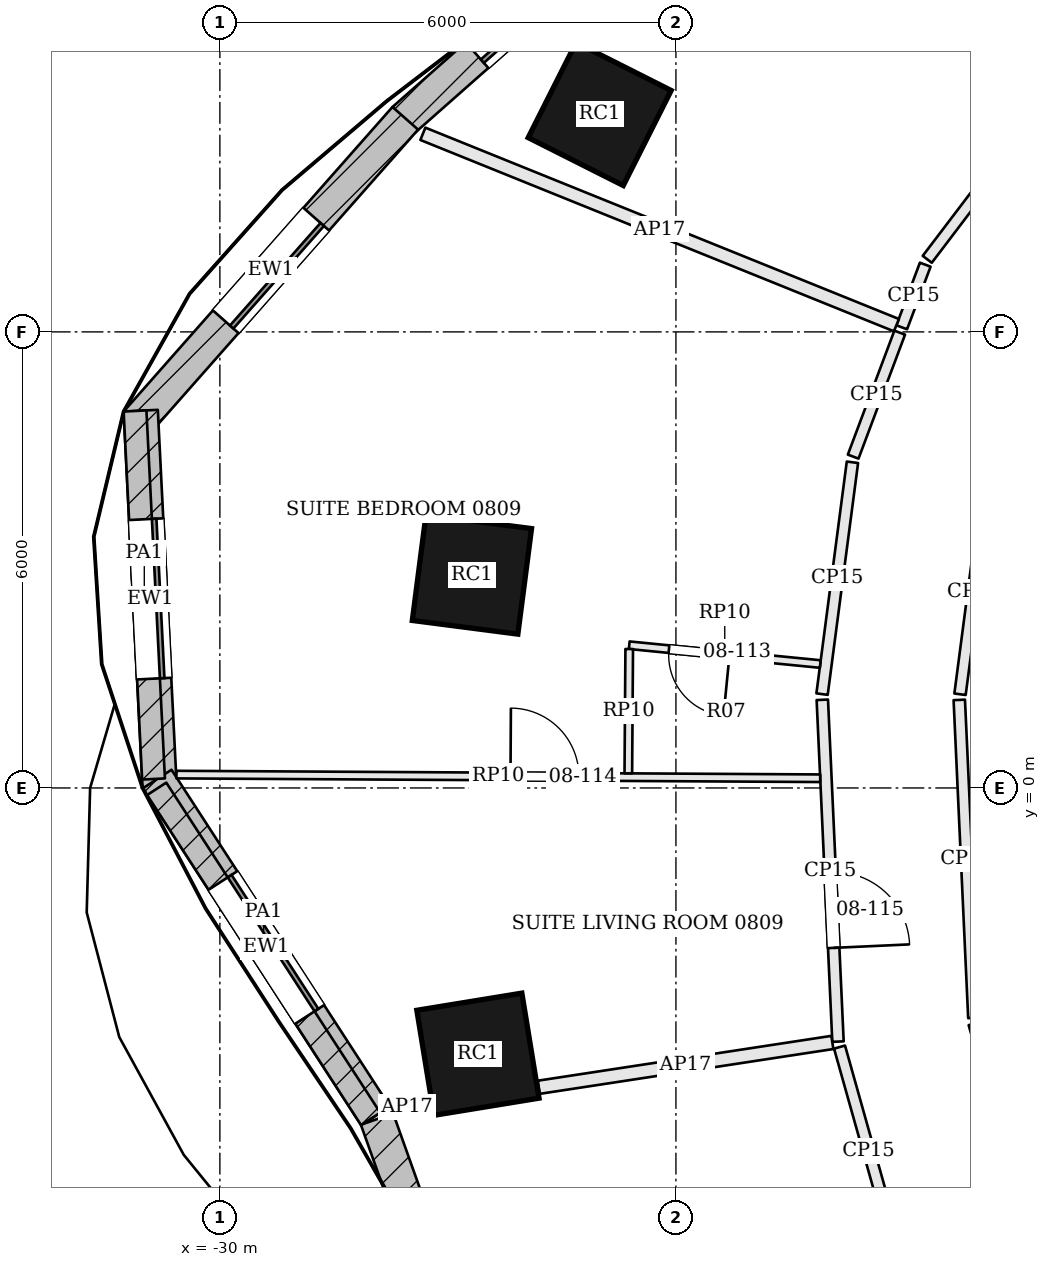
"""IFC4 building model, lengths in metres.
Left out: names, types, materials, properties, quantities, classifications, styles, units other than length and angle.
Written with IfcOpenShell. Run it as: python <this file> out.ifc"""

import sys

from ifc_helpers import new_model, si_unit, direction, frame, frame_2d, origin, origin_2d, place, context, subcontext, project, spatial, rectangle, extrude, element, fill, save


model = new_model("IFC4")
c1 = context("Model", 3, precision=1e-05, world=origin(), true_north=direction((0.0, 1.0)))
c2 = subcontext(c1, "Body", "Model", "MODEL_VIEW")
j1 = project(units=[si_unit("LENGTHUNIT", "METRE"), si_unit("PLANEANGLEUNIT", "RADIAN")], contexts=[c1])
p1 = place(None, origin())
s1 = spatial("IfcSite", under=j1, at=p1, CompositionType="ELEMENT")
p2 = place(p1, origin())
s2 = spatial("IfcBuilding", under=s1, at=p2, CompositionType="ELEMENT")
p3 = place(p2, frame((0.0, 0.0, 44.7)))
s3 = spatial("IfcBuildingStorey", under=s2, at=p3, CompositionType="ELEMENT", Elevation=44.7)
for number, where, z_axis, x_axis in (
    (1, (-25.003, 8.866, 0.0), (0.0, 0.0, 1.0), (-0.45, -0.893, 0.0)),
    (2, (-26.684, 2.808, 0.0), (0.0, 0.0, 1.0), (-0.128, -0.992, 0.0)),
    (3, (-26.605, -3.503, 0.0), (0.0, 0.0, 1.0), (0.161, -0.987, 0.0)),
):
    element("IfcColumn", number, at=place(p3, frame(where, z_axis=z_axis, x_axis=x_axis)), inside=s3, PredefinedType="COLUMN", context=c2, shape_type="SweptSolid", body=[
        extrude(rectangle(XDim=1.4, YDim=1.4, at=origin_2d()), origin(), (0.0, 0.0, 1.0), 3.6),
    ])
p4 = place(p3, frame((-24.078, 11.88, 0.0), z_axis=(0.0, 0.0, 1.0), x_axis=(-0.749778352475, -0.661689067583, 0.0)))
e4 = element("IfcWall", 4, at=p4, inside=s3, PredefinedType="SOLIDWALL", context=c2, shape_type="SweptSolid", body=[
    extrude(rectangle(XDim=4.67, YDim=0.45, at=frame_2d((2.335, 0.0))), origin(), (0.0, 0.0, 1.0), 3.4),
])
p5 = place(p4, frame((1.285, 0.0, 0.9)))
e5 = element("IfcOpeningElement", 5, at=p5, cuts=e4, PredefinedType="OPENING", context=c2, shape_type="SweptSolid", body=[
    extrude(rectangle(XDim=2.1, YDim=2.0, at=frame_2d((1.05, 1.0))), frame((0.0, 0.235, 0.0), z_axis=(0.0, -1.0, 0.0), x_axis=(1.0, 0.0, 0.0)), (0.0, 0.0, 1.0), 0.47),
])
p6 = place(p3, frame((-27.561, 8.81, 0.0), z_axis=(0.0, 0.0, 1.0), x_axis=(-0.661706312809, -0.749763132989, 0.0)))
e6 = element("IfcWall", 6, at=p6, inside=s3, PredefinedType="SOLIDWALL", context=c2, shape_type="SweptSolid", body=[
    extrude(rectangle(XDim=5.34, YDim=0.45, at=frame_2d((2.67, 0.0))), origin(), (0.0, 0.0, 1.0), 3.4),
])
p7 = place(p6, frame((1.77, 0.0, 0.9)))
e7 = element("IfcOpeningElement", 7, at=p7, cuts=e6, PredefinedType="OPENING", context=c2, shape_type="SweptSolid", body=[
    extrude(rectangle(XDim=1.8, YDim=2.0, at=frame_2d((0.9, 1.0))), frame((0.0, 0.235, 0.0), z_axis=(0.0, -1.0, 0.0), x_axis=(1.0, 0.0, 0.0)), (0.0, 0.0, 1.0), 0.47),
])
p8 = place(p3, frame((-31.041, 4.963, 0.0), z_axis=(0.0, 0.0, 1.0), x_axis=(0.050222481563, -0.99873805492, 0.0)))
e8 = element("IfcWall", 8, at=p8, inside=s3, PredefinedType="SOLIDWALL", context=c2, shape_type="SweptSolid", body=[
    extrude(rectangle(XDim=4.958, YDim=0.45, at=frame_2d((2.479, 0.0))), origin(), (0.0, 0.0, 1.0), 3.4),
])
p9 = place(p8, frame((1.429, 0.0, 0.9)))
e9 = element("IfcOpeningElement", 9, at=p9, cuts=e8, PredefinedType="OPENING", context=c2, shape_type="SweptSolid", body=[
    extrude(rectangle(XDim=2.1, YDim=2.0, at=frame_2d((1.05, 1.0))), frame((0.0, 0.235, 0.0), z_axis=(0.0, -1.0, 0.0), x_axis=(1.0, 0.0, 0.0)), (0.0, 0.0, 1.0), 0.47),
])
p10 = place(p3, frame((-30.825, 0.117, 0.0), z_axis=(0.0, 0.0, 1.0), x_axis=(0.543975629516, -0.839101015666, 0.0)))
e10 = element("IfcWall", 10, at=p10, inside=s3, PredefinedType="SOLIDWALL", context=c2, shape_type="SweptSolid", body=[
    extrude(rectangle(XDim=5.281, YDim=0.45, at=frame_2d((2.641, 0.0))), origin(), (0.0, 0.0, 1.0), 3.4),
])
p11 = place(p10, frame((1.591, 0.0, 0.9)))
e11 = element("IfcOpeningElement", 11, at=p11, cuts=e10, PredefinedType="OPENING", context=c2, shape_type="SweptSolid", body=[
    extrude(rectangle(XDim=2.1, YDim=2.0, at=frame_2d((1.05, 1.0))), frame((0.0, 0.235, 0.0), z_axis=(0.0, -1.0, 0.0), x_axis=(1.0, 0.0, 0.0)), (0.0, 0.0, 1.0), 0.47),
])
p12 = place(p3, frame((-27.933, -4.356, 0.0), z_axis=(0.0, 0.0, 1.0), x_axis=(0.335746005454, -0.941952557097, 0.0)))
e12 = element("IfcWall", 12, at=p12, inside=s3, PredefinedType="SOLIDWALL", context=c2, shape_type="SweptSolid", body=[
    extrude(rectangle(XDim=4.48, YDim=0.45, at=frame_2d((2.24, 0.0))), origin(), (0.0, 0.0, 1.0), 3.4),
])
p13 = place(p12, frame((1.19, 0.0, 0.9)))
e13 = element("IfcOpeningElement", 13, at=p13, cuts=e12, PredefinedType="OPENING", context=c2, shape_type="SweptSolid", body=[
    extrude(rectangle(XDim=2.1, YDim=2.0, at=frame_2d((1.05, 1.0))), frame((0.0, 0.235, 0.0), z_axis=(0.0, -1.0, 0.0), x_axis=(1.0, 0.0, 0.0)), (0.0, 0.0, 1.0), 0.47),
])
p14 = place(p3, frame((-31.116, 4.959, 3.6), z_axis=(0.0, 0.0, 1.0), x_axis=(0.05021140618, -0.998738611795, 0.0)))
e14 = element("IfcWall", 14, at=p14, inside=s3, PredefinedType="PARAPET", context=c2, shape_type="SweptSolid", body=[
    extrude(rectangle(XDim=4.848, YDim=0.3, at=frame_2d((2.424, 0.0))), origin(), (0.0, 0.0, 1.0), 1.1),
])
p15 = place(p3, frame((-30.831, -0.011, 3.6), z_axis=(0.0, 0.0, 1.0), x_axis=(0.543918219167, -0.839138231079, 0.0)))
e15 = element("IfcWall", 15, at=p15, inside=s3, PredefinedType="PARAPET", context=c2, shape_type="SweptSolid", body=[
    extrude(rectangle(XDim=5.174, YDim=0.3, at=frame_2d((2.587, 0.0))), origin(), (0.0, 0.0, 1.0), 1.1),
])
p16 = place(p3, frame((-18.523, 9.811, 0.0), z_axis=(0.0, 0.0, 1.0), x_axis=(-0.605040130963, -0.796194976073, 0.0)))
e16 = element("IfcWall", 16, at=p16, inside=s3, PredefinedType="PARTITIONING", context=c2, shape_type="SweptSolid", body=[
    extrude(rectangle(XDim=3.588, YDim=0.15, at=frame_2d((1.794, 0.0))), origin(), (0.0, 0.0, 1.0), 2.68),
])
p17 = place(p16, frame((1.183, 0.0, 0.0)))
e17 = element("IfcOpeningElement", 17, at=p17, cuts=e16, PredefinedType="OPENING", context=c2, shape_type="SweptSolid", body=[
    extrude(rectangle(XDim=1.0, YDim=2.1, at=frame_2d((0.5, 1.05))), frame((0.0, 0.085, 0.0), z_axis=(0.0, -1.0, 0.0), x_axis=(1.0, 0.0, 0.0)), (0.0, 0.0, 1.0), 0.17),
])
p18 = place(p3, frame((-20.72, 6.885, 0.0), z_axis=(0.0, 0.0, 1.0), x_axis=(-0.351457811596, -0.936203720708, 0.0)))
e18 = element("IfcWall", 18, at=p18, inside=s3, PredefinedType="PARTITIONING", context=c2, shape_type="SweptSolid", body=[
    extrude(rectangle(XDim=0.88, YDim=0.15, at=frame_2d((0.44, 0.0))), origin(), (0.0, 0.0, 1.0), 2.68),
])
p19 = place(p3, frame((-27.329, 8.606, 0.0), z_axis=(0.0, 0.0, 1.0), x_axis=(0.92718069074, -0.374614424068, 0.0)))
e19 = element("IfcWall", 19, at=p19, inside=s3, PredefinedType="PARTITIONING", context=c2, shape_type="SweptSolid", body=[
    extrude(rectangle(XDim=6.72, YDim=0.175, at=frame_2d((3.36, 0.0))), origin(), (0.0, 0.0, 1.0), 2.68),
])
p20 = place(p3, frame((-21.056, 5.99, 0.0), z_axis=(0.0, 0.0, 1.0), x_axis=(-0.351445911603, -0.936208187967, 0.0)))
e20 = element("IfcWall", 20, at=p20, inside=s3, PredefinedType="PARTITIONING", context=c2, shape_type="SweptSolid", body=[
    extrude(rectangle(XDim=1.742, YDim=0.15, at=frame_2d((0.871, 0.0))), origin(), (0.0, 0.0, 1.0), 2.68),
])
p21 = place(p3, frame((-21.678, 4.285, 0.0), z_axis=(0.0, 0.0, 1.0), x_axis=(-0.129922755307, -0.991524118543, 0.0)))
e21 = element("IfcWall", 21, at=p21, inside=s3, PredefinedType="PARTITIONING", context=c2, shape_type="SweptSolid", body=[
    extrude(rectangle(XDim=3.076, YDim=0.15, at=frame_2d((1.538, 0.0))), origin(), (0.0, 0.0, 1.0), 2.68),
])
p22 = place(p3, frame((-22.074, 1.16, 0.0), z_axis=(0.0, 0.0, 1.0), x_axis=(0.04582833941, -0.998949329699, 0.0)))
e22 = element("IfcWall", 22, at=p22, inside=s3, PredefinedType="PARTITIONING", context=c2, shape_type="SweptSolid", body=[
    extrude(rectangle(XDim=4.501, YDim=0.15, at=frame_2d((2.251, 0.0))), origin(), (0.0, 0.0, 1.0), 2.68),
])
p23 = place(p22, frame((2.267, 0.0, 0.0)))
e23 = element("IfcOpeningElement", 23, at=p23, cuts=e22, PredefinedType="OPENING", context=c2, shape_type="SweptSolid", body=[
    extrude(rectangle(XDim=1.0, YDim=2.1, at=frame_2d((0.5, 1.05))), frame((0.0, 0.085, 0.0), z_axis=(0.0, -1.0, 0.0), x_axis=(1.0, 0.0, 0.0)), (0.0, 0.0, 1.0), 0.17),
])
p24 = place(p3, frame((-27.845, -4.249, 0.0), z_axis=(0.0, 0.0, 1.0), x_axis=(0.988533937995, 0.15099885242, 0.0)))
e24 = element("IfcWall", 24, at=p24, inside=s3, PredefinedType="PARTITIONING", context=c2, shape_type="SweptSolid", body=[
    extrude(rectangle(XDim=0.624, YDim=0.175, at=frame_2d((0.312, 0.0))), origin(), (0.0, 0.0, 1.0), 2.68),
])
p25 = place(p3, frame((-25.804, -3.938, 0.0), z_axis=(0.0, 0.0, 1.0), x_axis=(0.988549437975, 0.15089734484, 0.0)))
e25 = element("IfcWall", 25, at=p25, inside=s3, PredefinedType="PARTITIONING", context=c2, shape_type="SweptSolid", body=[
    extrude(rectangle(XDim=3.907, YDim=0.175, at=frame_2d((1.954, 0.0))), origin(), (0.0, 0.0, 1.0), 2.68),
])
p26 = place(p3, frame((-21.848, -3.409, 0.0), z_axis=(0.0, 0.0, 1.0), x_axis=(0.27056596431, -0.962701438119, 0.0)))
e26 = element("IfcWall", 26, at=p26, inside=s3, PredefinedType="PARTITIONING", context=c2, shape_type="SweptSolid", body=[
    extrude(rectangle(XDim=2.834, YDim=0.15, at=frame_2d((1.417, 0.0))), origin(), (0.0, 0.0, 1.0), 2.68),
])
p27 = place(p3, frame((-19.443, -5.319, 0.0), z_axis=(0.0, 0.0, 1.0), x_axis=(-0.274791002319, 0.961503980774, 0.0)))
e27 = element("IfcWall", 27, at=p27, inside=s3, PredefinedType="PARTITIONING", context=c2, shape_type="SweptSolid", body=[
    extrude(rectangle(XDim=2.307, YDim=0.15, at=frame_2d((1.154, 0.0))), origin(), (0.0, 0.0, 1.0), 2.68),
])
p28 = place(p3, frame((-20.08, -3.025, 0.0), z_axis=(0.0, 0.0, 1.0), x_axis=(-0.04581750387, 0.998949826738, 0.0)))
e28 = element("IfcWall", 28, at=p28, inside=s3, PredefinedType="PARTITIONING", context=c2, shape_type="SweptSolid", body=[
    extrude(rectangle(XDim=4.188, YDim=0.15, at=frame_2d((2.094, 0.0))), origin(), (0.0, 0.0, 1.0), 2.68),
])
p29 = place(p3, frame((-20.262, 1.233, 0.0), z_axis=(0.0, 0.0, 1.0), x_axis=(0.129897568593, 0.991527418518, 0.0)))
e29 = element("IfcWall", 29, at=p29, inside=s3, PredefinedType="PARTITIONING", context=c2, shape_type="SweptSolid", body=[
    extrude(rectangle(XDim=2.71, YDim=0.15, at=frame_2d((1.355, 0.0))), origin(), (0.0, 0.0, 1.0), 2.68),
])
p30 = place(p3, frame((-30.571, 0.176, 0.0), z_axis=(0.0, 0.0, 1.0), x_axis=(0.999984039808, -0.005649790199, 0.0)))
e30 = element("IfcWall", 30, at=p30, inside=s3, PredefinedType="PARTITIONING", context=c2, shape_type="SweptSolid", body=[
    extrude(rectangle(XDim=8.47, YDim=0.1, at=frame_2d((4.235, 0.0))), origin(), (0.0, 0.0, 1.0), 2.68),
])
p31 = place(p30, frame((4.395, 0.0, 0.0)))
e31 = element("IfcOpeningElement", 31, at=p31, cuts=e30, PredefinedType="OPENING", context=c2, shape_type="SweptSolid", body=[
    extrude(rectangle(XDim=0.9, YDim=2.4, at=frame_2d((0.45, 1.2))), frame((0.0, 0.06, 0.0), z_axis=(0.0, -1.0, 0.0), x_axis=(1.0, 0.0, 0.0)), (0.0, 0.0, 1.0), 0.12),
])
p32 = place(p3, frame((-22.101, 1.63, 0.0), z_axis=(0.0, 0.0, 1.0), x_axis=(-0.99518257626, 0.098038971372, 0.0)))
e32 = element("IfcWall", 32, at=p32, inside=s3, PredefinedType="PARTITIONING", context=c2, shape_type="SweptSolid", body=[
    extrude(rectangle(XDim=2.525, YDim=0.1, at=frame_2d((1.263, 0.0))), origin(), (0.0, 0.0, 1.0), 2.68),
])
p33 = place(p32, frame((1.2, 0.0, 0.0)))
e33 = element("IfcOpeningElement", 33, at=p33, cuts=e32, PredefinedType="OPENING", context=c2, shape_type="SweptSolid", body=[
    extrude(rectangle(XDim=0.8, YDim=2.1, at=frame_2d((0.4, 1.05))), frame((0.0, 0.06, 0.0), z_axis=(0.0, -1.0, 0.0), x_axis=(1.0, 0.0, 0.0)), (0.0, 0.0, 1.0), 0.12),
])
p34 = place(p3, frame((-24.615, 1.828, 0.0), z_axis=(0.0, 0.0, 1.0), x_axis=(-0.007313237259, -0.999973257923, 0.0)))
e34 = element("IfcWall", 34, at=p34, inside=s3, PredefinedType="PARTITIONING", context=c2, shape_type="SweptSolid", body=[
    extrude(rectangle(XDim=1.636, YDim=0.1, at=frame_2d((0.818, 0.0))), origin(), (0.0, 0.0, 1.0), 2.68),
])
p35 = place(p5, origin())
e35 = element("IfcWindow", 35, at=p35, inside=s3, PartitioningType="SINGLE_PANEL", PredefinedType="WINDOW", context=c2, shape_type="SweptSolid", body=[
    extrude(rectangle(XDim=2.1, YDim=2.0, at=frame_2d((1.05, 1.0))), frame((0.0, 0.135, 0.0), z_axis=(0.0, -1.0, 0.0), x_axis=(1.0, 0.0, 0.0)), (0.0, 0.0, 1.0), 0.06),
])
fill(e5, e35)
p36 = place(p7, origin())
e36 = element("IfcWindow", 36, at=p36, inside=s3, PartitioningType="SINGLE_PANEL", PredefinedType="WINDOW", context=c2, shape_type="SweptSolid", body=[
    extrude(rectangle(XDim=1.8, YDim=2.0, at=frame_2d((0.9, 1.0))), frame((0.0, 0.135, 0.0), z_axis=(0.0, -1.0, 0.0), x_axis=(1.0, 0.0, 0.0)), (0.0, 0.0, 1.0), 0.06),
])
fill(e7, e36)
p37 = place(p9, origin())
e37 = element("IfcWindow", 37, at=p37, inside=s3, PartitioningType="SINGLE_PANEL", PredefinedType="WINDOW", context=c2, shape_type="SweptSolid", body=[
    extrude(rectangle(XDim=2.1, YDim=2.0, at=frame_2d((1.05, 1.0))), frame((0.0, 0.135, 0.0), z_axis=(0.0, -1.0, 0.0), x_axis=(1.0, 0.0, 0.0)), (0.0, 0.0, 1.0), 0.06),
])
fill(e9, e37)
p38 = place(p11, origin())
e38 = element("IfcWindow", 38, at=p38, inside=s3, PartitioningType="SINGLE_PANEL", PredefinedType="WINDOW", context=c2, shape_type="SweptSolid", body=[
    extrude(rectangle(XDim=2.1, YDim=2.0, at=frame_2d((1.05, 1.0))), frame((0.0, 0.135, 0.0), z_axis=(0.0, -1.0, 0.0), x_axis=(1.0, 0.0, 0.0)), (0.0, 0.0, 1.0), 0.06),
])
fill(e11, e38)
p39 = place(p33, origin())
e39 = element("IfcDoor", 39, at=p39, inside=s3, OperationType="SINGLE_SWING_LEFT", PredefinedType="DOOR", context=c2, shape_type="SweptSolid", body=[
    extrude(rectangle(XDim=0.8, YDim=2.1, at=frame_2d((0.4, 1.05))), frame((0.0, 0.025, 0.0), z_axis=(0.0, -1.0, 0.0), x_axis=(1.0, 0.0, 0.0)), (0.0, 0.0, 1.0), 0.05),
])
fill(e33, e39)
p40 = place(p31, origin())
e40 = element("IfcDoor", 40, at=p40, inside=s3, OperationType="SINGLE_SWING_LEFT", PredefinedType="DOOR", context=c2, shape_type="SweptSolid", body=[
    extrude(rectangle(XDim=0.9, YDim=2.4, at=frame_2d((0.45, 1.2))), frame((0.0, 0.025, 0.0), z_axis=(0.0, -1.0, 0.0), x_axis=(1.0, 0.0, 0.0)), (0.0, 0.0, 1.0), 0.05),
])
fill(e31, e40)
p41 = place(p23, origin())
e41 = element("IfcDoor", 41, at=p41, inside=s3, OperationType="SINGLE_SWING_RIGHT", PredefinedType="DOOR", context=c2, shape_type="SweptSolid", body=[
    extrude(rectangle(XDim=1.0, YDim=2.1, at=frame_2d((0.5, 1.05))), frame((0.0, 0.025, 0.0), z_axis=(0.0, -1.0, 0.0), x_axis=(1.0, 0.0, 0.0)), (0.0, 0.0, 1.0), 0.05),
])
fill(e23, e41)
save(model, sys.argv[1])
